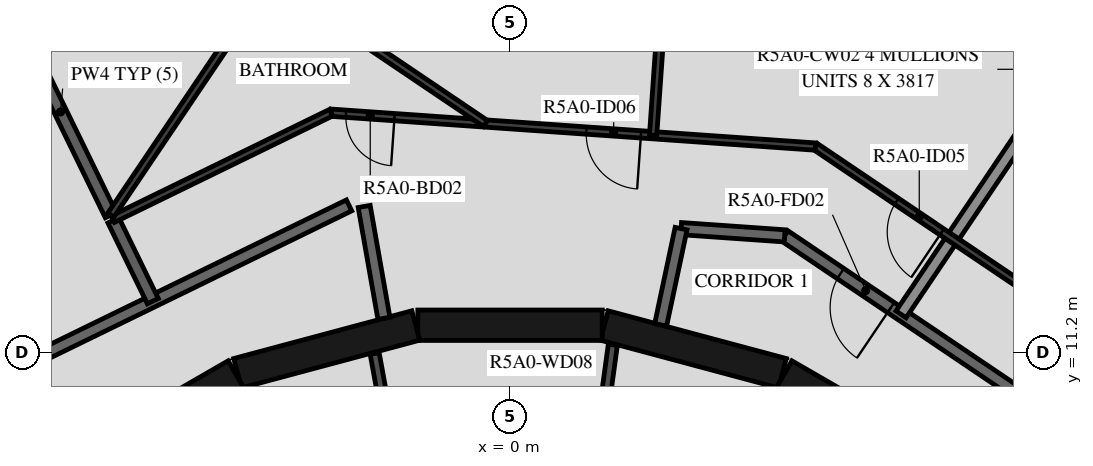
"""IFC4 building model, lengths in metres.
Left out: names, types, materials, properties, quantities, classifications, styles, units other than length and angle.
Written with IfcOpenShell. Run it as: python <this file> out.ifc"""

import sys

from ifc_helpers import new_model, si_unit, direction, frame, frame_2d, origin, place, context, subcontext, project, spatial, rectangle, extrude, element, fill, save


model = new_model("IFC4")
c1 = context("Model", 3, precision=1e-05, world=origin(), true_north=direction((0.0, 1.0)))
c2 = subcontext(c1, "Body", "Model", "MODEL_VIEW")
j1 = project(units=[si_unit("LENGTHUNIT", "METRE"), si_unit("PLANEANGLEUNIT", "RADIAN")], contexts=[c1])
p1 = place(None, origin())
s1 = spatial("IfcSite", under=j1, at=p1, CompositionType="ELEMENT")
p2 = place(p1, origin())
s2 = spatial("IfcBuilding", under=s1, at=p2, CompositionType="ELEMENT")
p3 = place(p2, frame((0.0, 0.0, 188.4)))
s3 = spatial("IfcBuildingStorey", under=s2, at=p3, CompositionType="ELEMENT", Elevation=188.4)
p4 = place(p3, frame((-0.808, 27.101, 0.03), z_axis=(0.0, 0.0, 1.0), x_axis=(0.76040780846, -0.649445890613, 0.0)))
e1 = element("IfcWall", 1, at=p4, inside=s3, PredefinedType="PARAPET", context=c2, shape_type="SweptSolid", body=[
    extrude(rectangle(XDim=36.429, YDim=0.2, at=frame_2d((18.214, 0.0))), origin(), (0.0, 0.0, 1.0), 1.5),
])
p5 = place(p3, frame((7.137, 9.329, 0.0), z_axis=(0.0, 0.0, 1.0), x_axis=(-0.865975092491, 0.500087131594, 0.0)))
e2 = element("IfcWall", 2, at=p5, inside=s3, PredefinedType="SHEAR", context=c2, shape_type="SweptSolid", body=[
    extrude(rectangle(XDim=3.033, YDim=0.5, at=frame_2d((1.516, 0.0))), origin(), (0.0, 0.0, 1.0), 3.12),
])
p6 = place(p5, frame((1.066, 0.0, 0.0)))
e3 = element("IfcOpeningElement", 3, at=p6, cuts=e2, PredefinedType="OPENING", context=c2, shape_type="SweptSolid", body=[
    extrude(rectangle(XDim=0.9, YDim=2.1, at=frame_2d((0.45, 1.05))), frame((0.0, 0.26, 0.0), z_axis=(0.0, -1.0, 0.0), x_axis=(1.0, 0.0, 0.0)), (0.0, 0.0, 1.0), 0.52),
])
for number, where, z_axis, x_axis in (
    (4, (4.479, 10.858, 0.0), (0.0, 0.0, 1.0), (-0.966, 0.259, 0.0)),
    (5, (1.516, 11.647, 0.0), (0.0, 0.0, 1.0), (-1.0, 0.0, 0.0)),
    (6, (-1.55, 11.643, 0.0), (0.0, 0.0, 1.0), (-0.966, -0.259, 0.0)),
    (7, (-4.51, 10.845, 0.0), (0.0, 0.0, 1.0), (-0.866, -0.5, 0.0)),
):
    element("IfcWall", number, at=place(p3, frame(where, z_axis=z_axis, x_axis=x_axis)), inside=s3, PredefinedType="SHEAR", context=c2, shape_type="SweptSolid", body=[
        extrude(rectangle(XDim=3.033, YDim=0.5, at=frame_2d((1.516, 0.0))), origin(), (0.0, 0.0, 1.0), 3.12),
    ])
p7 = place(p3, frame((1.691, 11.326, 0.0), z_axis=(0.0, 0.0, 1.0), x_axis=(-0.135344253201, -0.990798633994, 0.0)))
e8 = element("IfcWall", 8, at=p7, inside=s3, PredefinedType="PARTITIONING", context=c2, shape_type="SweptSolid", body=[
    extrude(rectangle(XDim=2.358, YDim=0.15, at=frame_2d((1.179, 0.0))), origin(), (0.0, 0.0, 1.0), 3.12),
])
p8 = place(p7, frame((0.729, 0.0, 0.0)))
e9 = element("IfcOpeningElement", 9, at=p8, cuts=e8, PredefinedType="OPENING", context=c2, shape_type="SweptSolid", body=[
    extrude(rectangle(XDim=0.9, YDim=2.1, at=frame_2d((0.45, 1.05))), frame((0.0, 0.085, 0.0), z_axis=(0.0, -1.0, 0.0), x_axis=(1.0, 0.0, 0.0)), (0.0, 0.0, 1.0), 0.17),
])
p9 = place(p3, frame((-1.825, 8.99, 0.0), z_axis=(0.0, 0.0, 1.0), x_axis=(-0.179955206115, 0.983674805915, 0.0)))
e10 = element("IfcWall", 10, at=p9, inside=s3, PredefinedType="PARTITIONING", context=c2, shape_type="SweptSolid", body=[
    extrude(rectangle(XDim=2.229, YDim=0.15, at=frame_2d((1.115, 0.0))), origin(), (0.0, 0.0, 1.0), 3.12),
])
p10 = place(p9, frame((0.665, 0.0, 0.0)))
e11 = element("IfcOpeningElement", 11, at=p10, cuts=e10, PredefinedType="OPENING", context=c2, shape_type="SweptSolid", body=[
    extrude(rectangle(XDim=0.9, YDim=2.1, at=frame_2d((0.45, 1.05))), frame((0.0, 0.085, 0.0), z_axis=(0.0, -1.0, 0.0), x_axis=(1.0, 0.0, 0.0)), (0.0, 0.0, 1.0), 0.17),
])
p11 = place(p3, frame((10.47, 9.101, 0.0), z_axis=(0.0, 0.0, 1.0), x_axis=(-0.829035841718, 0.559195469534, 0.0)))
e12 = element("IfcWall", 12, at=p11, inside=s3, PredefinedType="STANDARD", context=c2, shape_type="SweptSolid", body=[
    extrude(rectangle(XDim=7.181, YDim=0.2, at=frame_2d((3.591, 0.0))), origin(), (0.0, 0.0, 1.0), 3.12),
])
p12 = place(p11, frame((0.2, 0.0, 0.0)))
e13 = element("IfcOpeningElement", 13, at=p12, cuts=e12, PredefinedType="OPENING", context=c2, shape_type="SweptSolid", body=[
    extrude(rectangle(XDim=1.0, YDim=2.1, at=frame_2d((0.5, 1.05))), frame((0.0, 0.11, 0.0), z_axis=(0.0, -1.0, 0.0), x_axis=(1.0, 0.0, 0.0)), (0.0, 0.0, 1.0), 0.22),
])
p13 = place(p11, frame((5.073, 0.0, 0.0)))
e14 = element("IfcOpeningElement", 14, at=p13, cuts=e12, PredefinedType="OPENING", context=c2, shape_type="SweptSolid", body=[
    extrude(rectangle(XDim=1.0, YDim=2.1, at=frame_2d((0.5, 1.05))), frame((0.0, 0.11, 0.0), z_axis=(0.0, -1.0, 0.0), x_axis=(1.0, 0.0, 0.0)), (0.0, 0.0, 1.0), 0.22),
])
p14 = place(p3, frame((4.517, 13.117, 0.0), z_axis=(0.0, 0.0, 1.0), x_axis=(-0.997562153664, 0.069783591025, 0.0)))
e15 = element("IfcWall", 15, at=p14, inside=s3, PredefinedType="STANDARD", context=c2, shape_type="SweptSolid", body=[
    extrude(rectangle(XDim=1.707, YDim=0.2, at=frame_2d((0.854, 0.0))), origin(), (0.0, 0.0, 1.0), 3.12),
])
p15 = place(p3, frame((2.813, 13.236, 0.0), z_axis=(0.0, 0.0, 1.0), x_axis=(-0.207911086063, -0.978147729278, 0.0)))
e16 = element("IfcWall", 16, at=p15, inside=s3, PredefinedType="STANDARD", context=c2, shape_type="SweptSolid", body=[
    extrude(rectangle(XDim=1.618, YDim=0.2, at=frame_2d((0.809, 0.0))), origin(), (0.0, 0.0, 1.0), 3.12),
])
p16 = place(p3, frame((-2.074, 11.761, 0.0), z_axis=(0.0, 0.0, 1.0), x_axis=(-0.173740587112, 0.984791454263, 0.0)))
e17 = element("IfcWall", 17, at=p16, inside=s3, PredefinedType="STANDARD", context=c2, shape_type="SweptSolid", body=[
    extrude(rectangle(XDim=1.867, YDim=0.2, at=frame_2d((0.934, 0.0))), origin(), (0.0, 0.0, 1.0), 3.12),
])
p17 = place(p3, frame((-2.647, 13.618, 0.0), z_axis=(0.0, 0.0, 1.0), x_axis=(-0.898796543751, -0.438366026218, 0.0)))
e18 = element("IfcWall", 18, at=p17, inside=s3, PredefinedType="STANDARD", context=c2, shape_type="SweptSolid", body=[
    extrude(rectangle(XDim=7.181, YDim=0.2, at=frame_2d((3.591, 0.0))), origin(), (0.0, 0.0, 1.0), 3.12),
])
p18 = place(p3, frame((9.104, 15.79, 0.0), z_axis=(0.0, 0.0, 1.0), x_axis=(-0.559193912135, -0.829036892201, 0.0)))
e19 = element("IfcWall", 19, at=p18, inside=s3, PredefinedType="STANDARD", context=c2, shape_type="SweptSolid", body=[
    extrude(rectangle(XDim=4.781, YDim=0.2, at=frame_2d((2.39, 0.0))), origin(), (0.0, 0.0, 1.0), 2.73),
])
p19 = place(p3, frame((-6.522, 13.373, 0.0), z_axis=(0.0, 0.0, 1.0), x_axis=(0.438277270821, -0.8988398266, 0.0)))
e20 = element("IfcWall", 20, at=p19, inside=s3, PredefinedType="STANDARD", context=c2, shape_type="SweptSolid", body=[
    extrude(rectangle(XDim=1.479, YDim=0.2, at=frame_2d((0.74, 0.0))), origin(), (0.0, 0.0, 1.0), 3.12),
])
p20 = place(p3, frame((-8.219, 16.851, 0.0), z_axis=(0.0, 0.0, 1.0), x_axis=(0.438291091101, -0.898833087654, 0.0)))
e21 = element("IfcWall", 21, at=p20, inside=s3, PredefinedType="STANDARD", context=c2, shape_type="SweptSolid", body=[
    extrude(rectangle(XDim=3.774, YDim=0.2, at=frame_2d((1.887, 0.0))), origin(), (0.0, 0.0, 1.0), 3.12),
])
p21 = place(p3, frame((11.642, 10.12, 0.0), z_axis=(0.0, 0.0, 1.0), x_axis=(-0.829032241779, 0.55920080659, 0.0)))
e22 = element("IfcWall", 22, at=p21, inside=s3, PredefinedType="PARTITIONING", context=c2, shape_type="SweptSolid", body=[
    extrude(rectangle(XDim=7.985, YDim=0.12, at=frame_2d((3.992, 0.0))), origin(), (0.0, 0.0, 1.0), 3.12),
])
p22 = place(p21, frame((0.2, 0.0, 0.0)))
e23 = element("IfcOpeningElement", 23, at=p22, cuts=e22, PredefinedType="OPENING", context=c2, shape_type="SweptSolid", body=[
    extrude(rectangle(XDim=0.9, YDim=2.1, at=frame_2d((0.45, 1.05))), frame((0.0, 0.07, 0.0), z_axis=(0.0, -1.0, 0.0), x_axis=(1.0, 0.0, 0.0)), (0.0, 0.0, 1.0), 0.14),
])
p23 = place(p21, frame((5.475, 0.0, 0.0)))
e24 = element("IfcOpeningElement", 24, at=p23, cuts=e22, PredefinedType="OPENING", context=c2, shape_type="SweptSolid", body=[
    extrude(rectangle(XDim=0.9, YDim=2.1, at=frame_2d((0.45, 1.05))), frame((0.0, 0.07, 0.0), z_axis=(0.0, -1.0, 0.0), x_axis=(1.0, 0.0, 0.0)), (0.0, 0.0, 1.0), 0.14),
])
p24 = place(p3, frame((5.022, 14.585, 0.0), z_axis=(0.0, 0.0, 1.0), x_axis=(-0.997565118395, 0.069741197017, 0.0)))
e25 = element("IfcWall", 25, at=p24, inside=s3, PredefinedType="PARTITIONING", context=c2, shape_type="SweptSolid", body=[
    extrude(rectangle(XDim=7.985, YDim=0.12, at=frame_2d((3.993, 0.0))), origin(), (0.0, 0.0, 1.0), 3.12),
])
p25 = place(p24, frame((2.875, 0.0, 0.0)))
e26 = element("IfcOpeningElement", 26, at=p25, cuts=e25, PredefinedType="OPENING", context=c2, shape_type="SweptSolid", body=[
    extrude(rectangle(XDim=0.9, YDim=2.1, at=frame_2d((0.45, 1.05))), frame((0.0, 0.07, 0.0), z_axis=(0.0, -1.0, 0.0), x_axis=(1.0, 0.0, 0.0)), (0.0, 0.0, 1.0), 0.14),
])
p26 = place(p24, frame((6.938, 0.0, 0.0)))
e27 = element("IfcOpeningElement", 27, at=p26, cuts=e25, PredefinedType="OPENING", context=c2, shape_type="SweptSolid", body=[
    extrude(rectangle(XDim=0.8, YDim=2.1, at=frame_2d((0.4, 1.05))), frame((0.0, 0.07, 0.0), z_axis=(0.0, -1.0, 0.0), x_axis=(1.0, 0.0, 0.0)), (0.0, 0.0, 1.0), 0.14),
])
p27 = place(p3, frame((-2.943, 15.142, 0.0), z_axis=(0.0, 0.0, 1.0), x_axis=(-0.89881075705, -0.438336883014, 0.0)))
e28 = element("IfcWall", 28, at=p27, inside=s3, PredefinedType="PARTITIONING", context=c2, shape_type="SweptSolid", body=[
    extrude(rectangle(XDim=3.992, YDim=0.12, at=frame_2d((1.996, 0.0))), origin(), (0.0, 0.0, 1.0), 3.12),
])
p28 = place(p3, frame((2.725, 20.092, 0.0), z_axis=(0.0, 0.0, 1.0), x_axis=(-0.069766716578, -0.997563333958, 0.0)))
e29 = element("IfcWall", 29, at=p28, inside=s3, PredefinedType="PARTITIONING", context=c2, shape_type="SweptSolid", body=[
    extrude(rectangle(XDim=5.333, YDim=0.12, at=frame_2d((2.667, 0.0))), origin(), (0.0, 0.0, 1.0), 3.12),
])
p29 = place(p3, frame((-7.476, 19.735, 0.0), z_axis=(0.0, 0.0, 1.0), x_axis=(0.829035412992, -0.559196105142, 0.0)))
e30 = element("IfcWall", 30, at=p29, inside=s3, PredefinedType="PARTITIONING", context=c2, shape_type="SweptSolid", body=[
    extrude(rectangle(XDim=8.531, YDim=0.12, at=frame_2d((4.266, 0.0))), origin(), (0.0, 0.0, 1.0), 3.12),
])
p30 = place(p29, frame((2.204, 0.0, 0.0)))
e31 = element("IfcOpeningElement", 31, at=p30, cuts=e30, PredefinedType="OPENING", context=c2, shape_type="SweptSolid", body=[
    extrude(rectangle(XDim=0.9, YDim=2.1, at=frame_2d((0.45, 1.05))), frame((0.0, 0.07, 0.0), z_axis=(0.0, -1.0, 0.0), x_axis=(1.0, 0.0, 0.0)), (0.0, 0.0, 1.0), 0.14),
])
p31 = place(p3, frame((-3.939, 17.35, 0.0), z_axis=(0.0, 0.0, 1.0), x_axis=(-0.559193216274, -0.829037361566, 0.0)))
e32 = element("IfcWall", 32, at=p31, inside=s3, PredefinedType="PARTITIONING", context=c2, shape_type="SweptSolid", body=[
    extrude(rectangle(XDim=4.694, YDim=0.12, at=frame_2d((2.347, 0.0))), origin(), (0.0, 0.0, 1.0), 3.12),
])
p32 = place(p13, origin())
e33 = element("IfcDoor", 33, at=p32, inside=s3, OperationType="SINGLE_SWING_RIGHT", PredefinedType="DOOR", context=c2, shape_type="SweptSolid", body=[
    extrude(rectangle(XDim=1.0, YDim=2.1, at=frame_2d((0.5, 1.05))), frame((0.0, 0.025, 0.0), z_axis=(0.0, -1.0, 0.0), x_axis=(1.0, 0.0, 0.0)), (0.0, 0.0, 1.0), 0.05),
])
fill(e14, e33)
p33 = place(p23, origin())
e34 = element("IfcDoor", 34, at=p33, inside=s3, OperationType="SINGLE_SWING_RIGHT", PredefinedType="DOOR", context=c2, shape_type="SweptSolid", body=[
    extrude(rectangle(XDim=0.9, YDim=2.1, at=frame_2d((0.45, 1.05))), frame((0.0, 0.025, 0.0), z_axis=(0.0, -1.0, 0.0), x_axis=(1.0, 0.0, 0.0)), (0.0, 0.0, 1.0), 0.05),
])
fill(e24, e34)
p34 = place(p25, origin())
e35 = element("IfcDoor", 35, at=p34, inside=s3, OperationType="SINGLE_SWING_RIGHT", PredefinedType="DOOR", context=c2, shape_type="SweptSolid", body=[
    extrude(rectangle(XDim=0.9, YDim=2.1, at=frame_2d((0.45, 1.05))), frame((0.0, 0.025, 0.0), z_axis=(0.0, -1.0, 0.0), x_axis=(1.0, 0.0, 0.0)), (0.0, 0.0, 1.0), 0.05),
])
fill(e26, e35)
p35 = place(p26, origin())
e36 = element("IfcDoor", 36, at=p35, inside=s3, OperationType="SINGLE_SWING_RIGHT", PredefinedType="DOOR", context=c2, shape_type="SweptSolid", body=[
    extrude(rectangle(XDim=0.8, YDim=2.1, at=frame_2d((0.4, 1.05))), frame((0.0, 0.025, 0.0), z_axis=(0.0, -1.0, 0.0), x_axis=(1.0, 0.0, 0.0)), (0.0, 0.0, 1.0), 0.05),
])
fill(e27, e36)
save(model, sys.argv[1])
